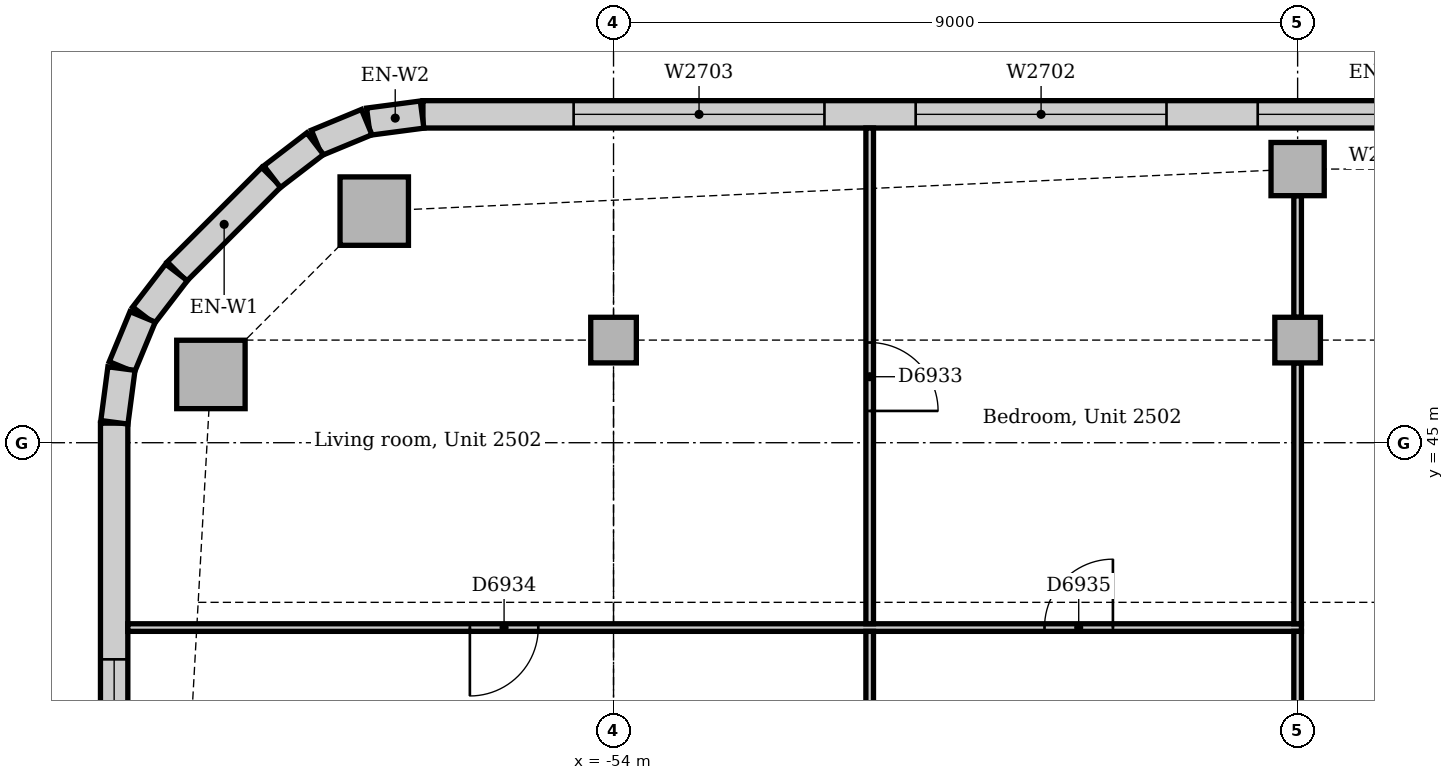
"""IFC4 building model, lengths in metres.
Left out: names, types, materials, properties, quantities, classifications, styles, units other than length and angle.
Written with IfcOpenShell. Run it as: python <this file> out.ifc"""

import sys

from ifc_helpers import new_model, si_unit, direction, frame, frame_2d, origin, origin_2d, place, context, subcontext, project, spatial, rectangle, extrude, element, fill, save


model = new_model("IFC4")
c1 = context("Model", 3, precision=1e-05, world=origin(), true_north=direction((0.0, 1.0)))
c2 = subcontext(c1, "Body", "Model", "MODEL_VIEW")
j1 = project(units=[si_unit("LENGTHUNIT", "METRE"), si_unit("PLANEANGLEUNIT", "RADIAN")], contexts=[c1])
p1 = place(None, origin())
s1 = spatial("IfcSite", under=j1, at=p1, CompositionType="ELEMENT")
p2 = place(p1, origin())
s2 = spatial("IfcBuilding", under=s1, at=p2, CompositionType="ELEMENT")
p3 = place(p2, frame((0.0, 0.0, 108.0)))
s3 = spatial("IfcBuildingStorey", under=s2, at=p3, CompositionType="ELEMENT", Elevation=108.0)
for number, where, z_axis, x_axis in (
    (1, (-57.148, 48.047, 0.0), (0.0, 0.0, 1.0), (1.0, 0.0, 0.0)),
    (2, (-59.297, 45.898, 0.0), (0.0, 0.0, 1.0), (1.0, 0.0, 0.0)),
):
    element("IfcColumn", number, at=place(p3, frame(where, z_axis=z_axis, x_axis=x_axis)), inside=s3, PredefinedType="COLUMN", context=c2, shape_type="SweptSolid", body=[
        extrude(rectangle(XDim=0.9, YDim=0.9, at=origin_2d()), origin(), (0.0, 0.0, 1.0), 3.85),
    ])
p4 = place(p3, frame((-45.0, 48.6, 0.0), z_axis=(0.0, 0.0, 1.0), x_axis=(1.0, 0.0, 0.0)))
e3 = element("IfcColumn", 3, at=p4, inside=s3, PredefinedType="COLUMN", context=c2, shape_type="SweptSolid", body=[
    extrude(rectangle(XDim=0.7, YDim=0.7, at=origin_2d()), origin(), (0.0, 0.0, 1.0), 3.85),
])
for number, where, z_axis, x_axis in (
    (4, (-54.0, 46.35, 0.0), (0.0, 0.0, 1.0), (1.0, 0.0, 0.0)),
    (5, (-45.0, 46.35, 0.0), (0.0, 0.0, 1.0), (1.0, 0.0, 0.0)),
):
    element("IfcColumn", number, at=place(p3, frame(where, z_axis=z_axis, x_axis=x_axis)), inside=s3, PredefinedType="COLUMN", context=c2, shape_type="SweptSolid", body=[
        extrude(rectangle(XDim=0.6, YDim=0.6, at=origin_2d()), origin(), (0.0, 0.0, 1.0), 3.85),
    ])
p5 = place(p3, frame((-31.243, 49.32, 0.0), z_axis=(0.0, 0.0, 1.0), x_axis=(-1.0, 0.0, 0.0)))
e6 = element("IfcWall", 6, at=p5, inside=s3, PredefinedType="STANDARD", context=c2, shape_type="SweptSolid", body=[
    extrude(rectangle(XDim=25.265, YDim=0.36, at=frame_2d((12.632, 0.0))), origin(), (0.0, 0.0, 1.0), 3.85),
])
p6 = place(p5, frame((1.982, 0.0, 0.9)))
e7 = element("IfcOpeningElement", 7, at=p6, cuts=e6, PredefinedType="OPENING", context=c2, shape_type="SweptSolid", body=[
    extrude(rectangle(XDim=3.3, YDim=1.6, at=frame_2d((1.65, 0.8))), frame((0.0, 0.19, 0.0), z_axis=(0.0, -1.0, 0.0), x_axis=(1.0, 0.0, 0.0)), (0.0, 0.0, 1.0), 0.38),
])
p7 = place(p5, frame((6.482, 0.0, 0.9)))
e8 = element("IfcOpeningElement", 8, at=p7, cuts=e6, PredefinedType="OPENING", context=c2, shape_type="SweptSolid", body=[
    extrude(rectangle(XDim=3.3, YDim=1.6, at=frame_2d((1.65, 0.8))), frame((0.0, 0.19, 0.0), z_axis=(0.0, -1.0, 0.0), x_axis=(1.0, 0.0, 0.0)), (0.0, 0.0, 1.0), 0.38),
])
p8 = place(p5, frame((10.982, 0.0, 0.9)))
e9 = element("IfcOpeningElement", 9, at=p8, cuts=e6, PredefinedType="OPENING", context=c2, shape_type="SweptSolid", body=[
    extrude(rectangle(XDim=3.3, YDim=1.6, at=frame_2d((1.65, 0.8))), frame((0.0, 0.19, 0.0), z_axis=(0.0, -1.0, 0.0), x_axis=(1.0, 0.0, 0.0)), (0.0, 0.0, 1.0), 0.38),
])
p9 = place(p5, frame((15.482, 0.0, 0.9)))
e10 = element("IfcOpeningElement", 10, at=p9, cuts=e6, PredefinedType="OPENING", context=c2, shape_type="SweptSolid", body=[
    extrude(rectangle(XDim=3.3, YDim=1.6, at=frame_2d((1.65, 0.8))), frame((0.0, 0.19, 0.0), z_axis=(0.0, -1.0, 0.0), x_axis=(1.0, 0.0, 0.0)), (0.0, 0.0, 1.0), 0.38),
])
p10 = place(p5, frame((19.982, 0.0, 0.9)))
e11 = element("IfcOpeningElement", 11, at=p10, cuts=e6, PredefinedType="OPENING", context=c2, shape_type="SweptSolid", body=[
    extrude(rectangle(XDim=3.3, YDim=1.6, at=frame_2d((1.65, 0.8))), frame((0.0, 0.19, 0.0), z_axis=(0.0, -1.0, 0.0), x_axis=(1.0, 0.0, 0.0)), (0.0, 0.0, 1.0), 0.38),
])
p11 = place(p3, frame((-58.501, 48.494, 0.0), z_axis=(0.0, 0.0, 1.0), x_axis=(-0.707106781187, -0.707106781187, 0.0)))
e12 = element("IfcWall", 12, at=p11, inside=s3, PredefinedType="STANDARD", context=c2, shape_type="SweptSolid", body=[
    extrude(rectangle(XDim=1.757, YDim=0.36, at=frame_2d((0.879, 0.0))), origin(), (0.0, 0.0, 1.0), 3.85),
])
p12 = place(p3, frame((-60.57, 45.257, 0.0), z_axis=(0.0, 0.0, 1.0), x_axis=(0.0, -1.0, 0.0)))
e13 = element("IfcWall", 13, at=p12, inside=s3, PredefinedType="STANDARD", context=c2, shape_type="SweptSolid", body=[
    extrude(rectangle(XDim=21.515, YDim=0.36, at=frame_2d((10.757, 0.0))), origin(), (0.0, 0.0, 1.0), 3.85),
])
p13 = place(p12, frame((3.107, 0.0, 0.9)))
e14 = element("IfcOpeningElement", 14, at=p13, cuts=e13, PredefinedType="OPENING", context=c2, shape_type="SweptSolid", body=[
    extrude(rectangle(XDim=1.8, YDim=1.6, at=frame_2d((0.9, 0.8))), frame((0.0, 0.19, 0.0), z_axis=(0.0, -1.0, 0.0), x_axis=(1.0, 0.0, 0.0)), (0.0, 0.0, 1.0), 0.38),
])
p14 = place(p12, frame((6.857, 0.0, 0.9)))
e15 = element("IfcOpeningElement", 15, at=p14, cuts=e13, PredefinedType="OPENING", context=c2, shape_type="SweptSolid", body=[
    extrude(rectangle(XDim=3.3, YDim=1.6, at=frame_2d((1.65, 0.8))), frame((0.0, 0.19, 0.0), z_axis=(0.0, -1.0, 0.0), x_axis=(1.0, 0.0, 0.0)), (0.0, 0.0, 1.0), 0.38),
])
p15 = place(p12, frame((11.357, 0.0, 0.9)))
e16 = element("IfcOpeningElement", 16, at=p15, cuts=e13, PredefinedType="OPENING", context=c2, shape_type="SweptSolid", body=[
    extrude(rectangle(XDim=3.3, YDim=1.6, at=frame_2d((1.65, 0.8))), frame((0.0, 0.19, 0.0), z_axis=(0.0, -1.0, 0.0), x_axis=(1.0, 0.0, 0.0)), (0.0, 0.0, 1.0), 0.38),
])
p16 = place(p12, frame((15.857, 0.0, 0.9)))
e17 = element("IfcOpeningElement", 17, at=p16, cuts=e13, PredefinedType="OPENING", context=c2, shape_type="SweptSolid", body=[
    extrude(rectangle(XDim=3.3, YDim=1.6, at=frame_2d((1.65, 0.8))), frame((0.0, 0.19, 0.0), z_axis=(0.0, -1.0, 0.0), x_axis=(1.0, 0.0, 0.0)), (0.0, 0.0, 1.0), 0.38),
])
for number, where, z_axis, x_axis in (
    (18, (-56.519, 49.317, 0.0), (0.0, 0.0, 1.0), (-0.991, -0.131, 0.0)),
    (19, (-57.247, 49.218, 0.0), (0.0, 0.0, 1.0), (-0.924, -0.383, 0.0)),
):
    element("IfcWall", number, at=place(p3, frame(where, z_axis=z_axis, x_axis=x_axis)), inside=s3, PredefinedType="STANDARD", context=c2, shape_type="SweptSolid", body=[
        extrude(rectangle(XDim=0.713, YDim=0.36, at=frame_2d((0.356, 0.0))), origin(), (0.0, 0.0, 1.0), 3.85),
    ])
for number, where, z_axis, x_axis in (
    (20, (-57.925, 48.934, 0.0), (0.0, 0.0, 1.0), (-0.793, -0.609, 0.0)),
    (21, (-59.75, 47.241, 0.0), (0.0, 0.0, 1.0), (-0.609, -0.793, 0.0)),
):
    element("IfcWall", number, at=place(p3, frame(where, z_axis=z_axis, x_axis=x_axis)), inside=s3, PredefinedType="STANDARD", context=c2, shape_type="SweptSolid", body=[
        extrude(rectangle(XDim=0.713, YDim=0.36, at=frame_2d((0.357, 0.0))), origin(), (0.0, 0.0, 1.0), 3.85),
    ])
for number, where, z_axis, x_axis in (
    (22, (-60.195, 46.656, 0.0), (0.0, 0.0, 1.0), (-0.383, -0.924, 0.0)),
    (23, (-60.474, 45.976, 0.0), (0.0, 0.0, 1.0), (-0.131, -0.991, 0.0)),
):
    element("IfcWall", number, at=place(p3, frame(where, z_axis=z_axis, x_axis=x_axis)), inside=s3, PredefinedType="STANDARD", context=c2, shape_type="SweptSolid", body=[
        extrude(rectangle(XDim=0.713, YDim=0.36, at=frame_2d((0.356, 0.0))), origin(), (0.0, 0.0, 1.0), 3.85),
    ])
p17 = place(p3, frame((-60.39, 42.568, 0.0), z_axis=(0.0, 0.0, 1.0), x_axis=(1.0, 0.0, 0.0)))
e24 = element("IfcWall", 24, at=p17, inside=s3, PredefinedType="PARTITIONING", context=c2, shape_type="SweptSolid", body=[
    extrude(rectangle(XDim=15.44, YDim=0.1, at=frame_2d((7.72, 0.0))), origin(), (0.0, 0.0, 1.0), 3.85),
])
p18 = place(p17, frame((4.5, 0.0, 0.0)))
e25 = element("IfcOpeningElement", 25, at=p18, cuts=e24, PredefinedType="OPENING", context=c2, shape_type="SweptSolid", body=[
    extrude(rectangle(XDim=0.9, YDim=2.1, at=frame_2d((0.45, 1.05))), frame((0.0, 0.06, 0.0), z_axis=(0.0, -1.0, 0.0), x_axis=(1.0, 0.0, 0.0)), (0.0, 0.0, 1.0), 0.12),
])
p19 = place(p17, frame((12.06, 0.0, 0.0)))
e26 = element("IfcOpeningElement", 26, at=p19, cuts=e24, PredefinedType="OPENING", context=c2, shape_type="SweptSolid", body=[
    extrude(rectangle(XDim=0.9, YDim=2.1, at=frame_2d((0.45, 1.05))), frame((0.0, 0.06, 0.0), z_axis=(0.0, -1.0, 0.0), x_axis=(1.0, 0.0, 0.0)), (0.0, 0.0, 1.0), 0.12),
])
p20 = place(p3, frame((-45.0, 42.618, 0.0), z_axis=(0.0, 0.0, 1.0), x_axis=(0.0, 1.0, 0.0)))
e27 = element("IfcWall", 27, at=p20, inside=s3, PredefinedType="PARTITIONING", context=c2, shape_type="SweptSolid", body=[
    extrude(rectangle(XDim=3.432, YDim=0.1, at=frame_2d((1.716, 0.0))), origin(), (0.0, 0.0, 1.0), 3.362),
])
p21 = place(p3, frame((-45.0, 39.25, 0.0), z_axis=(0.0, 0.0, 1.0), x_axis=(0.0, 1.0, 0.0)))
e28 = element("IfcWall", 28, at=p21, inside=s3, PredefinedType="PARTITIONING", context=c2, shape_type="SweptSolid", body=[
    extrude(rectangle(XDim=3.268, YDim=0.1, at=frame_2d((1.634, 0.0))), origin(), (0.0, 0.0, 1.0), 3.362),
])
p22 = place(p3, frame((-45.0, 46.65, 0.0), z_axis=(0.0, 0.0, 1.0), x_axis=(0.0, 1.0, 0.0)))
e29 = element("IfcWall", 29, at=p22, inside=s3, PredefinedType="PARTITIONING", context=c2, shape_type="SweptSolid", body=[
    extrude(rectangle(XDim=1.6, YDim=0.1, at=frame_2d((0.8, 0.0))), origin(), (0.0, 0.0, 1.0), 3.652),
])
p23 = place(p3, frame((-50.63, 39.25, 0.0), z_axis=(0.0, 0.0, 1.0), x_axis=(0.0, 1.0, 0.0)))
e30 = element("IfcWall", 30, at=p23, inside=s3, PredefinedType="PARTITIONING", context=c2, shape_type="SweptSolid", body=[
    extrude(rectangle(XDim=3.268, YDim=0.1, at=frame_2d((1.634, 0.0))), origin(), (0.0, 0.0, 1.0), 3.85),
])
p24 = place(p3, frame((-50.63, 42.618, 0.0), z_axis=(0.0, 0.0, 1.0), x_axis=(0.0, 1.0, 0.0)))
e31 = element("IfcWall", 31, at=p24, inside=s3, PredefinedType="PARTITIONING", context=c2, shape_type="SweptSolid", body=[
    extrude(rectangle(XDim=6.522, YDim=0.1, at=frame_2d((3.261, 0.0))), origin(), (0.0, 0.0, 1.0), 3.85),
])
p25 = place(p24, frame((2.8, 0.0, 0.0)))
e32 = element("IfcOpeningElement", 32, at=p25, cuts=e31, PredefinedType="OPENING", context=c2, shape_type="SweptSolid", body=[
    extrude(rectangle(XDim=0.9, YDim=2.1, at=frame_2d((0.45, 1.05))), frame((0.0, 0.06, 0.0), z_axis=(0.0, -1.0, 0.0), x_axis=(1.0, 0.0, 0.0)), (0.0, 0.0, 1.0), 0.12),
])
p26 = place(p8, origin())
e33 = element("IfcWindow", 33, at=p26, inside=s3, PartitioningType="SINGLE_PANEL", PredefinedType="WINDOW", context=c2, shape_type="SweptSolid", body=[
    extrude(rectangle(XDim=3.3, YDim=1.6, at=frame_2d((1.65, 0.8))), frame((0.0, 0.13, 0.0), z_axis=(0.0, -1.0, 0.0), x_axis=(1.0, 0.0, 0.0)), (0.0, 0.0, 1.0), 0.06),
])
fill(e9, e33)
p27 = place(p9, origin())
e34 = element("IfcWindow", 34, at=p27, inside=s3, PartitioningType="SINGLE_PANEL", PredefinedType="WINDOW", context=c2, shape_type="SweptSolid", body=[
    extrude(rectangle(XDim=3.3, YDim=1.6, at=frame_2d((1.65, 0.8))), frame((0.0, 0.13, 0.0), z_axis=(0.0, -1.0, 0.0), x_axis=(1.0, 0.0, 0.0)), (0.0, 0.0, 1.0), 0.06),
])
fill(e10, e34)
p28 = place(p10, origin())
e35 = element("IfcWindow", 35, at=p28, inside=s3, PartitioningType="SINGLE_PANEL", PredefinedType="WINDOW", context=c2, shape_type="SweptSolid", body=[
    extrude(rectangle(XDim=3.3, YDim=1.6, at=frame_2d((1.65, 0.8))), frame((0.0, 0.13, 0.0), z_axis=(0.0, -1.0, 0.0), x_axis=(1.0, 0.0, 0.0)), (0.0, 0.0, 1.0), 0.06),
])
fill(e11, e35)
p29 = place(p13, origin())
e36 = element("IfcWindow", 36, at=p29, inside=s3, PartitioningType="SINGLE_PANEL", PredefinedType="WINDOW", context=c2, shape_type="SweptSolid", body=[
    extrude(rectangle(XDim=1.8, YDim=1.6, at=frame_2d((0.9, 0.8))), frame((0.0, 0.13, 0.0), z_axis=(0.0, -1.0, 0.0), x_axis=(1.0, 0.0, 0.0)), (0.0, 0.0, 1.0), 0.06),
])
fill(e14, e36)
p30 = place(p25, frame((0.9, 0.0, 0.0), z_axis=(0.0, 0.0, 1.0), x_axis=(-1.0, 0.0, 0.0)))
e37 = element("IfcDoor", 37, at=p30, inside=s3, OperationType="SINGLE_SWING_RIGHT", PredefinedType="DOOR", context=c2, shape_type="SweptSolid", body=[
    extrude(rectangle(XDim=0.9, YDim=2.1, at=frame_2d((0.45, 1.05))), frame((0.0, 0.025, 0.0), z_axis=(0.0, -1.0, 0.0), x_axis=(1.0, 0.0, 0.0)), (0.0, 0.0, 1.0), 0.05),
])
fill(e32, e37)
p31 = place(p18, frame((0.9, 0.0, 0.0), z_axis=(0.0, 0.0, 1.0), x_axis=(-1.0, 0.0, 0.0)))
e38 = element("IfcDoor", 38, at=p31, inside=s3, OperationType="SINGLE_SWING_RIGHT", PredefinedType="DOOR", context=c2, shape_type="SweptSolid", body=[
    extrude(rectangle(XDim=0.9, YDim=2.1, at=frame_2d((0.45, 1.05))), frame((0.0, 0.025, 0.0), z_axis=(0.0, -1.0, 0.0), x_axis=(1.0, 0.0, 0.0)), (0.0, 0.0, 1.0), 0.05),
])
fill(e25, e38)
p32 = place(p19, origin())
e39 = element("IfcDoor", 39, at=p32, inside=s3, OperationType="SINGLE_SWING_RIGHT", PredefinedType="DOOR", context=c2, shape_type="SweptSolid", body=[
    extrude(rectangle(XDim=0.9, YDim=2.1, at=frame_2d((0.45, 1.05))), frame((0.0, 0.025, 0.0), z_axis=(0.0, -1.0, 0.0), x_axis=(1.0, 0.0, 0.0)), (0.0, 0.0, 1.0), 0.05),
])
fill(e26, e39)
save(model, sys.argv[1])
